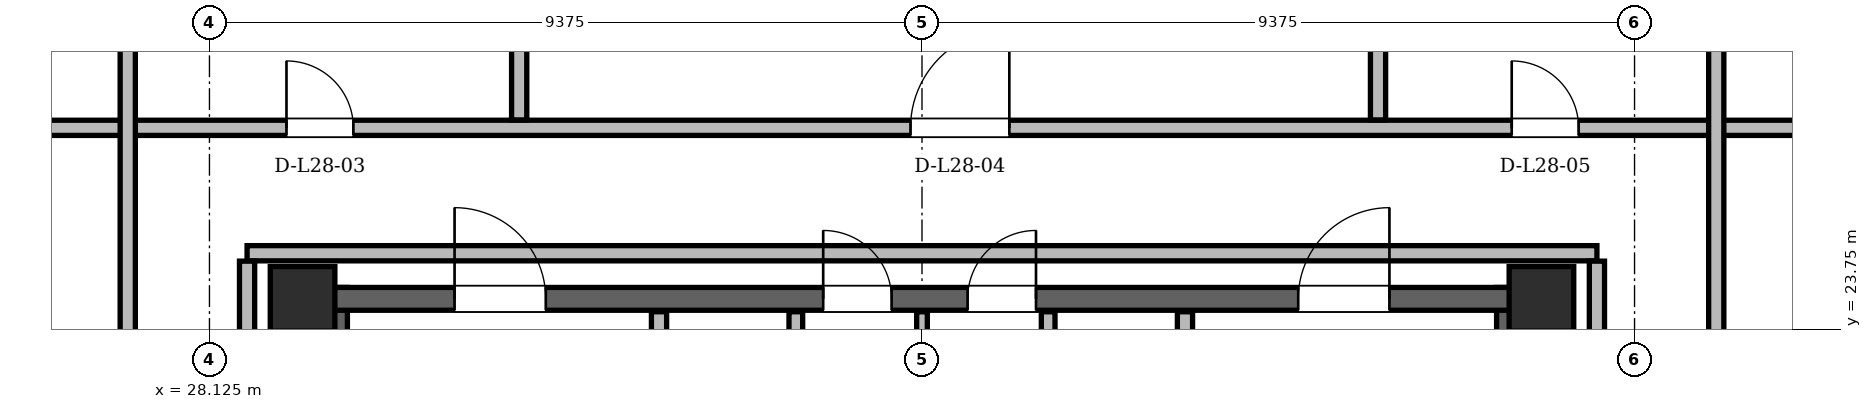
"""IFC4 building model, lengths in metres.
Left out: names, types, materials, properties, quantities, classifications, styles, units other than length and angle.
Written with IfcOpenShell. Run it as: python <this file> out.ifc"""

import sys

from ifc_helpers import new_model, si_unit, direction, frame, frame_2d, origin, origin_2d, place, context, subcontext, project, spatial, rectangle, hollow_rectangle, extrude, element, fill, save


model = new_model("IFC4")
c1 = context("Model", 3, precision=1e-05, world=origin(), true_north=direction((0.0, 1.0)))
c2 = subcontext(c1, "Body", "Model", "MODEL_VIEW")
j1 = project(units=[si_unit("LENGTHUNIT", "METRE"), si_unit("PLANEANGLEUNIT", "RADIAN")], contexts=[c1])
p1 = place(None, origin())
s1 = spatial("IfcSite", under=j1, at=p1, CompositionType="ELEMENT")
p2 = place(p1, origin())
s2 = spatial("IfcBuilding", under=s1, at=p2, CompositionType="ELEMENT")
p3 = place(p2, frame((0.0, 0.0, 107.7)))
s3 = spatial("IfcBuildingStorey", under=s2, at=p3, CompositionType="ELEMENT", Elevation=107.7)
for number, where, z_axis, x_axis in (
    (1, (45.65, 24.15, 0.0), (0.0, 0.0, 1.0), (1.0, 0.0, 0.0)),
    (2, (29.35, 24.15, 0.0), (0.0, 0.0, 1.0), (1.0, 0.0, 0.0)),
):
    element("IfcColumn", number, at=place(p3, frame(where, z_axis=z_axis, x_axis=x_axis)), inside=s3, PredefinedType="COLUMN", context=c2, shape_type="SweptSolid", body=[
        extrude(hollow_rectangle(XDim=0.85, YDim=0.85, WallThickness=0.07, at=origin_2d()), origin(), (0.0, 0.0, 1.0), 4.5),
    ])
for number, where, z_axis, x_axis in (
    (3, (29.715, 11.0, 0.0), (0.0, 0.0, 1.0), (0.0, 1.0, 0.0)),
    (4, (45.285, 11.0, 0.0), (0.0, 0.0, 1.0), (0.0, 1.0, 0.0)),
):
    element("IfcWall", number, at=place(p3, frame(where, z_axis=z_axis, x_axis=x_axis)), inside=s3, PredefinedType="SHEAR", context=c2, shape_type="SweptSolid", body=[
        extrude(rectangle(XDim=13.3, YDim=0.45, at=frame_2d((6.65, 0.0))), origin(), (0.0, 0.0, 1.0), 4.26),
    ])
p4 = place(p3, frame((29.65, 24.15, 0.0), z_axis=(0.0, 0.0, 1.0), x_axis=(1.0, 0.0, 0.0)))
e5 = element("IfcWall", 5, at=p4, inside=s3, PredefinedType="SHEAR", context=c2, shape_type="SweptSolid", body=[
    extrude(rectangle(XDim=15.7, YDim=0.3, at=frame_2d((7.85, 0.0))), origin(), (0.0, 0.0, 1.0), 4.26),
])
p5 = place(p4, frame((1.7, 0.0, 0.0)))
e6 = element("IfcOpeningElement", 6, at=p5, cuts=e5, PredefinedType="OPENING", context=c2, shape_type="SweptSolid", body=[
    extrude(rectangle(XDim=1.2, YDim=2.2, at=frame_2d((0.6, 1.1))), frame((0.0, 0.15, 0.0), z_axis=(0.0, -1.0, 0.0), x_axis=(1.0, 0.0, 0.0)), (0.0, 0.0, 1.0), 0.3),
])
p6 = place(p4, frame((12.8, 0.0, 0.0)))
e7 = element("IfcOpeningElement", 7, at=p6, cuts=e5, PredefinedType="OPENING", context=c2, shape_type="SweptSolid", body=[
    extrude(rectangle(XDim=1.2, YDim=2.2, at=frame_2d((0.6, 1.1))), frame((0.0, 0.15, 0.0), z_axis=(0.0, -1.0, 0.0), x_axis=(1.0, 0.0, 0.0)), (0.0, 0.0, 1.0), 0.3),
])
p7 = place(p4, frame((6.55, 0.0, 0.0)))
e8 = element("IfcOpeningElement", 8, at=p7, cuts=e5, PredefinedType="OPENING", context=c2, shape_type="SweptSolid", body=[
    extrude(rectangle(XDim=0.9, YDim=2.05, at=frame_2d((0.45, 1.025))), frame((0.0, 0.15, 0.0), z_axis=(0.0, -1.0, 0.0), x_axis=(1.0, 0.0, 0.0)), (0.0, 0.0, 1.0), 0.3),
])
p8 = place(p4, frame((8.45, 0.0, 0.0)))
e9 = element("IfcOpeningElement", 9, at=p8, cuts=e5, PredefinedType="OPENING", context=c2, shape_type="SweptSolid", body=[
    extrude(rectangle(XDim=0.9, YDim=2.05, at=frame_2d((0.45, 1.025))), frame((0.0, 0.15, 0.0), z_axis=(0.0, -1.0, 0.0), x_axis=(1.0, 0.0, 0.0)), (0.0, 0.0, 1.0), 0.3),
])
p9 = place(p3, frame((34.04, 19.48, 0.0), z_axis=(0.0, 0.0, 1.0), x_axis=(0.0, 1.0, 0.0)))
e10 = element("IfcWall", 10, at=p9, inside=s3, PredefinedType="PARTITIONING", context=c2, shape_type="SweptSolid", body=[
    extrude(rectangle(XDim=4.5, YDim=0.2, at=frame_2d((2.25, 0.0))), origin(), (0.0, 0.0, 1.0), 3.3),
])
p10 = place(p9, frame((2.12, 0.0, 0.0)))
e11 = element("IfcOpeningElement", 11, at=p10, cuts=e10, PredefinedType="OPENING", context=c2, shape_type="SweptSolid", body=[
    extrude(rectangle(XDim=1.1, YDim=2.2, at=frame_2d((0.55, 1.1))), frame((0.0, 0.1, 0.0), z_axis=(0.0, -1.0, 0.0), x_axis=(1.0, 0.0, 0.0)), (0.0, 0.0, 1.0), 0.2),
])
p11 = place(p3, frame((35.84, 20.96, 0.0), z_axis=(0.0, 0.0, 1.0), x_axis=(0.0, 1.0, 0.0)))
e12 = element("IfcWall", 12, at=p11, inside=s3, PredefinedType="PARTITIONING", context=c2, shape_type="SweptSolid", body=[
    extrude(rectangle(XDim=3.02, YDim=0.18, at=frame_2d((1.51, 0.0))), origin(), (0.0, 0.0, 1.0), 3.3),
])
p12 = place(p3, frame((40.96, 19.48, 0.0), z_axis=(0.0, 0.0, 1.0), x_axis=(0.0, 1.0, 0.0)))
e13 = element("IfcWall", 13, at=p12, inside=s3, PredefinedType="PARTITIONING", context=c2, shape_type="SweptSolid", body=[
    extrude(rectangle(XDim=4.5, YDim=0.2, at=frame_2d((2.25, 0.0))), origin(), (0.0, 0.0, 1.0), 3.3),
])
p13 = place(p12, frame((2.12, 0.0, 0.0)))
e14 = element("IfcOpeningElement", 14, at=p13, cuts=e13, PredefinedType="OPENING", context=c2, shape_type="SweptSolid", body=[
    extrude(rectangle(XDim=1.1, YDim=2.2, at=frame_2d((0.55, 1.1))), frame((0.0, 0.1, 0.0), z_axis=(0.0, -1.0, 0.0), x_axis=(1.0, 0.0, 0.0)), (0.0, 0.0, 1.0), 0.2),
])
p14 = place(p3, frame((39.16, 20.96, 0.0), z_axis=(0.0, 0.0, 1.0), x_axis=(0.0, 1.0, 0.0)))
e15 = element("IfcWall", 15, at=p14, inside=s3, PredefinedType="PARTITIONING", context=c2, shape_type="SweptSolid", body=[
    extrude(rectangle(XDim=3.02, YDim=0.18, at=frame_2d((1.51, 0.0))), origin(), (0.0, 0.0, 1.0), 3.3),
])
p15 = place(p3, frame((37.5, 21.06, 0.0), z_axis=(0.0, 0.0, 1.0), x_axis=(0.0, 1.0, 0.0)))
e16 = element("IfcWall", 16, at=p15, inside=s3, PredefinedType="PARTITIONING", context=c2, shape_type="SweptSolid", body=[
    extrude(rectangle(XDim=2.92, YDim=0.14, at=frame_2d((1.46, 0.0))), origin(), (0.0, 0.0, 1.0), 3.3),
])
p16 = place(p3, frame((28.62, 24.75, 0.0), z_axis=(0.0, 0.0, 1.0), x_axis=(1.0, 0.0, 0.0)))
e17 = element("IfcWall", 17, at=p16, inside=s3, PredefinedType="PARTITIONING", context=c2, shape_type="SweptSolid", body=[
    extrude(rectangle(XDim=17.76, YDim=0.2, at=frame_2d((8.88, 0.0))), origin(), (0.0, 0.0, 1.0), 3.714),
])
p17 = place(p3, frame((22.123, 26.4, 0.0), z_axis=(0.0, 0.0, 1.0), x_axis=(1.0, 0.0, 0.0)))
e18 = element("IfcWall", 18, at=p17, inside=s3, PredefinedType="PARTITIONING", context=c2, shape_type="SweptSolid", body=[
    extrude(rectangle(XDim=30.753, YDim=0.2, at=frame_2d((15.377, 0.0))), origin(), (0.0, 0.0, 1.0), 3.714),
])
p18 = place(p17, frame((7.015, 0.0, 0.0)))
e19 = element("IfcOpeningElement", 19, at=p18, cuts=e18, PredefinedType="OPENING", context=c2, shape_type="SweptSolid", body=[
    extrude(rectangle(XDim=0.88, YDim=2.08, at=frame_2d((0.44, 1.04))), frame((0.0, 0.1, 0.0), z_axis=(0.0, -1.0, 0.0), x_axis=(1.0, 0.0, 0.0)), (0.0, 0.0, 1.0), 0.2),
])
p19 = place(p17, frame((15.226, 0.0, 0.0)))
e20 = element("IfcOpeningElement", 20, at=p19, cuts=e18, PredefinedType="OPENING", context=c2, shape_type="SweptSolid", body=[
    extrude(rectangle(XDim=1.3, YDim=2.2, at=frame_2d((0.65, 1.1))), frame((0.0, 0.1, 0.0), z_axis=(0.0, -1.0, 0.0), x_axis=(1.0, 0.0, 0.0)), (0.0, 0.0, 1.0), 0.2),
])
p20 = place(p17, frame((23.136, 0.0, 0.0)))
e21 = element("IfcOpeningElement", 21, at=p20, cuts=e18, PredefinedType="OPENING", context=c2, shape_type="SweptSolid", body=[
    extrude(rectangle(XDim=0.88, YDim=2.08, at=frame_2d((0.44, 1.04))), frame((0.0, 0.1, 0.0), z_axis=(0.0, -1.0, 0.0), x_axis=(1.0, 0.0, 0.0)), (0.0, 0.0, 1.0), 0.2),
])
p21 = place(p3, frame((27.05, 8.854, 0.0), z_axis=(0.0, 0.0, 1.0), x_axis=(0.0, 1.0, 0.0)))
e22 = element("IfcWall", 22, at=p21, inside=s3, PredefinedType="PARTITIONING", context=c2, shape_type="SweptSolid", body=[
    extrude(rectangle(XDim=24.542, YDim=0.2, at=frame_2d((12.271, 0.0))), origin(), (0.0, 0.0, 1.0), 3.714),
])
p22 = place(p21, frame((4.472, 0.0, 0.0)))
e23 = element("IfcOpeningElement", 23, at=p22, cuts=e22, PredefinedType="OPENING", context=c2, shape_type="SweptSolid", body=[
    extrude(rectangle(XDim=1.3, YDim=2.2, at=frame_2d((0.65, 1.1))), frame((0.0, 0.1, 0.0), z_axis=(0.0, -1.0, 0.0), x_axis=(1.0, 0.0, 0.0)), (0.0, 0.0, 1.0), 0.2),
])
p23 = place(p21, frame((11.521, 0.0, 0.0)))
e24 = element("IfcOpeningElement", 24, at=p23, cuts=e22, PredefinedType="OPENING", context=c2, shape_type="SweptSolid", body=[
    extrude(rectangle(XDim=1.3, YDim=2.2, at=frame_2d((0.65, 1.1))), frame((0.0, 0.1, 0.0), z_axis=(0.0, -1.0, 0.0), x_axis=(1.0, 0.0, 0.0)), (0.0, 0.0, 1.0), 0.2),
])
p24 = place(p3, frame((28.62, 10.504, 0.0), z_axis=(0.0, 0.0, 1.0), x_axis=(0.0, 1.0, 0.0)))
e25 = element("IfcWall", 25, at=p24, inside=s3, PredefinedType="PARTITIONING", context=c2, shape_type="SweptSolid", body=[
    extrude(rectangle(XDim=14.142, YDim=0.2, at=frame_2d((7.071, 0.0))), origin(), (0.0, 0.0, 1.0), 3.714),
])
p25 = place(p3, frame((32.2, 26.504, 0.0), z_axis=(0.0, 0.0, 1.0), x_axis=(0.0, 1.0, 0.0)))
e26 = element("IfcWall", 26, at=p25, inside=s3, PredefinedType="PARTITIONING", context=c2, shape_type="SweptSolid", body=[
    extrude(rectangle(XDim=6.892, YDim=0.2, at=frame_2d((3.446, 0.0))), origin(), (0.0, 0.0, 1.0), 4.26),
])
p26 = place(p3, frame((43.5, 26.504, 0.0), z_axis=(0.0, 0.0, 1.0), x_axis=(0.0, 1.0, 0.0)))
e27 = element("IfcWall", 27, at=p26, inside=s3, PredefinedType="PARTITIONING", context=c2, shape_type="SweptSolid", body=[
    extrude(rectangle(XDim=3.592, YDim=0.2, at=frame_2d((1.796, 0.0))), origin(), (0.0, 0.0, 1.0), 4.26),
])
p27 = place(p3, frame((46.38, 10.504, 0.0), z_axis=(0.0, 0.0, 1.0), x_axis=(0.0, 1.0, 0.0)))
e28 = element("IfcWall", 28, at=p27, inside=s3, PredefinedType="PARTITIONING", context=c2, shape_type="SweptSolid", body=[
    extrude(rectangle(XDim=14.142, YDim=0.2, at=frame_2d((7.071, 0.0))), origin(), (0.0, 0.0, 1.0), 3.714),
])
p28 = place(p3, frame((47.95, 8.854, 0.0), z_axis=(0.0, 0.0, 1.0), x_axis=(0.0, 1.0, 0.0)))
e29 = element("IfcWall", 29, at=p28, inside=s3, PredefinedType="PARTITIONING", context=c2, shape_type="SweptSolid", body=[
    extrude(rectangle(XDim=21.242, YDim=0.2, at=frame_2d((10.621, 0.0))), origin(), (0.0, 0.0, 1.0), 3.714),
])
p29 = place(p28, frame((5.222, 0.0, 0.0)))
e30 = element("IfcOpeningElement", 30, at=p29, cuts=e29, PredefinedType="OPENING", context=c2, shape_type="SweptSolid", body=[
    extrude(rectangle(XDim=1.3, YDim=2.2, at=frame_2d((0.65, 1.1))), frame((0.0, 0.1, 0.0), z_axis=(0.0, -1.0, 0.0), x_axis=(1.0, 0.0, 0.0)), (0.0, 0.0, 1.0), 0.2),
])
p30 = place(p28, frame((12.272, 0.0, 0.0)))
e31 = element("IfcOpeningElement", 31, at=p30, cuts=e29, PredefinedType="OPENING", context=c2, shape_type="SweptSolid", body=[
    extrude(rectangle(XDim=1.3, YDim=2.2, at=frame_2d((0.65, 1.1))), frame((0.0, 0.1, 0.0), z_axis=(0.0, -1.0, 0.0), x_axis=(1.0, 0.0, 0.0)), (0.0, 0.0, 1.0), 0.2),
])
p31 = place(p5, origin())
e32 = element("IfcDoor", 32, at=p31, inside=s3, OperationType="SINGLE_SWING_LEFT", PredefinedType="DOOR", context=c2, shape_type="SweptSolid", body=[
    extrude(rectangle(XDim=1.2, YDim=2.2, at=frame_2d((0.6, 1.1))), frame((0.0, 0.025, 0.0), z_axis=(0.0, -1.0, 0.0), x_axis=(1.0, 0.0, 0.0)), (0.0, 0.0, 1.0), 0.05),
])
fill(e6, e32)
p32 = place(p6, origin())
e33 = element("IfcDoor", 33, at=p32, inside=s3, OperationType="SINGLE_SWING_RIGHT", PredefinedType="DOOR", context=c2, shape_type="SweptSolid", body=[
    extrude(rectangle(XDim=1.2, YDim=2.2, at=frame_2d((0.6, 1.1))), frame((0.0, 0.025, 0.0), z_axis=(0.0, -1.0, 0.0), x_axis=(1.0, 0.0, 0.0)), (0.0, 0.0, 1.0), 0.05),
])
fill(e7, e33)
p33 = place(p7, origin())
e34 = element("IfcDoor", 34, at=p33, inside=s3, OperationType="SINGLE_SWING_LEFT", PredefinedType="DOOR", context=c2, shape_type="SweptSolid", body=[
    extrude(rectangle(XDim=0.9, YDim=2.05, at=frame_2d((0.45, 1.025))), frame((0.0, 0.025, 0.0), z_axis=(0.0, -1.0, 0.0), x_axis=(1.0, 0.0, 0.0)), (0.0, 0.0, 1.0), 0.05),
])
fill(e8, e34)
p34 = place(p8, origin())
e35 = element("IfcDoor", 35, at=p34, inside=s3, OperationType="SINGLE_SWING_RIGHT", PredefinedType="DOOR", context=c2, shape_type="SweptSolid", body=[
    extrude(rectangle(XDim=0.9, YDim=2.05, at=frame_2d((0.45, 1.025))), frame((0.0, 0.025, 0.0), z_axis=(0.0, -1.0, 0.0), x_axis=(1.0, 0.0, 0.0)), (0.0, 0.0, 1.0), 0.05),
])
fill(e9, e35)
p35 = place(p18, origin())
e36 = element("IfcDoor", 36, at=p35, inside=s3, OperationType="SINGLE_SWING_LEFT", PredefinedType="DOOR", context=c2, shape_type="SweptSolid", body=[
    extrude(rectangle(XDim=0.88, YDim=2.08, at=frame_2d((0.44, 1.04))), frame((0.0, 0.025, 0.0), z_axis=(0.0, -1.0, 0.0), x_axis=(1.0, 0.0, 0.0)), (0.0, 0.0, 1.0), 0.05),
])
fill(e19, e36)
p36 = place(p19, origin())
e37 = element("IfcDoor", 37, at=p36, inside=s3, OperationType="SINGLE_SWING_RIGHT", PredefinedType="DOOR", context=c2, shape_type="SweptSolid", body=[
    extrude(rectangle(XDim=1.3, YDim=2.2, at=frame_2d((0.65, 1.1))), frame((0.0, 0.025, 0.0), z_axis=(0.0, -1.0, 0.0), x_axis=(1.0, 0.0, 0.0)), (0.0, 0.0, 1.0), 0.05),
])
fill(e20, e37)
p37 = place(p20, origin())
e38 = element("IfcDoor", 38, at=p37, inside=s3, OperationType="SINGLE_SWING_LEFT", PredefinedType="DOOR", context=c2, shape_type="SweptSolid", body=[
    extrude(rectangle(XDim=0.88, YDim=2.08, at=frame_2d((0.44, 1.04))), frame((0.0, 0.025, 0.0), z_axis=(0.0, -1.0, 0.0), x_axis=(1.0, 0.0, 0.0)), (0.0, 0.0, 1.0), 0.05),
])
fill(e21, e38)
save(model, sys.argv[1])
